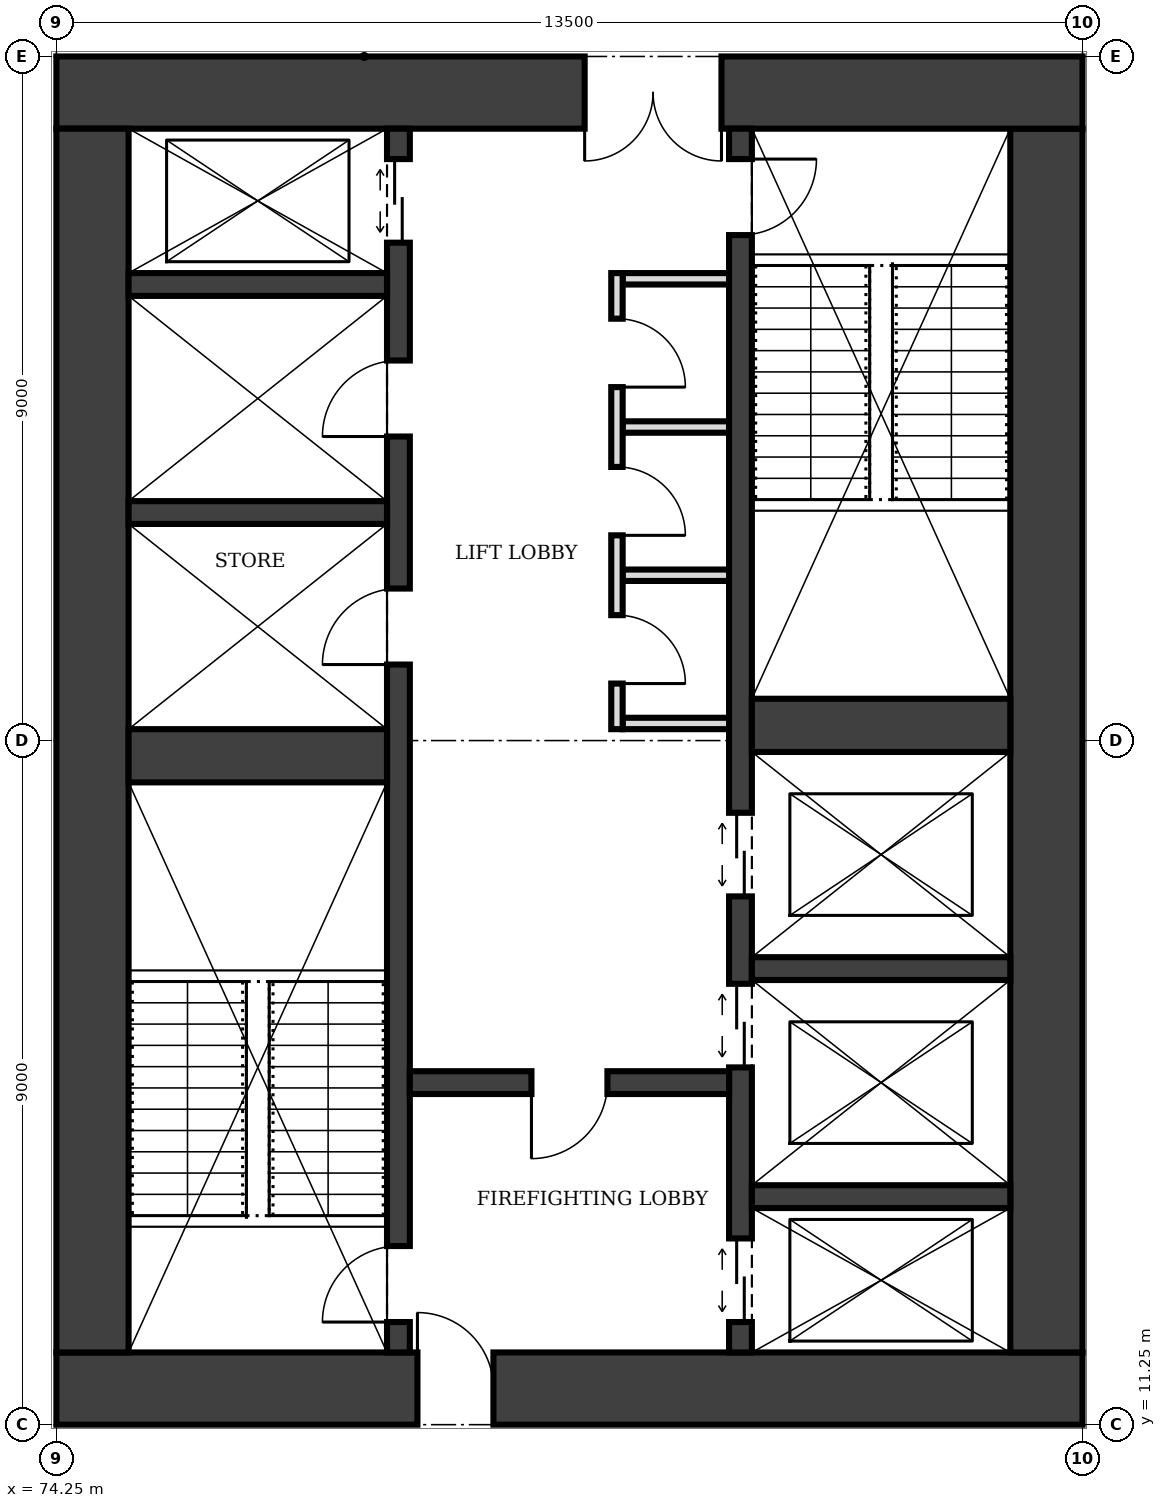
"""IFC4 building model, lengths in metres.
Left out: names, types, materials, properties, quantities, classifications, styles, units other than length and angle.
Written with IfcOpenShell. Run it as: python <this file> out.ifc"""

import sys

from ifc_helpers import new_model, si_unit, direction, frame, frame_2d, origin, place, context, subcontext, project, spatial, rectangle, extrude, element, fill, save


model = new_model("IFC4")
c1 = context("Model", 3, precision=1e-05, world=origin(), true_north=direction((0.0, 1.0)))
c2 = subcontext(c1, "Body", "Model", "MODEL_VIEW")
j1 = project(units=[si_unit("LENGTHUNIT", "METRE"), si_unit("PLANEANGLEUNIT", "RADIAN")], contexts=[c1])
p1 = place(None, origin())
s1 = spatial("IfcSite", under=j1, at=p1, CompositionType="ELEMENT")
p2 = place(p1, origin())
s2 = spatial("IfcBuilding", under=s1, at=p2, CompositionType="ELEMENT")
p3 = place(p2, frame((0.0, 0.0, 125.0)))
s3 = spatial("IfcBuildingStorey", under=s2, at=p3, CompositionType="ELEMENT", Elevation=125.0)
p4 = place(p3, frame((74.25, 11.725, 0.0), z_axis=(0.0, 0.0, 1.0), x_axis=(1.0, 0.0, 0.0)))
e1 = element("IfcWall", 1, at=p4, inside=s3, PredefinedType="SHEAR", context=c2, shape_type="SweptSolid", body=[
    extrude(rectangle(XDim=13.5, YDim=0.95, at=frame_2d((6.75, 0.0))), origin(), (0.0, 0.0, 1.0), 4.0),
])
p5 = place(p4, frame((4.75, 0.0, 0.0)))
e2 = element("IfcOpeningElement", 2, at=p5, cuts=e1, PredefinedType="OPENING", context=c2, shape_type="SweptSolid", body=[
    extrude(rectangle(XDim=1.0, YDim=2.1, at=frame_2d((0.5, 1.05))), frame((0.0, 0.485, 0.0), z_axis=(0.0, -1.0, 0.0), x_axis=(1.0, 0.0, 0.0)), (0.0, 0.0, 1.0), 0.97),
])
p6 = place(p3, frame((87.275, 12.2, 0.0), z_axis=(0.0, 0.0, 1.0), x_axis=(0.0, 1.0, 0.0)))
e3 = element("IfcWall", 3, at=p6, inside=s3, PredefinedType="SHEAR", context=c2, shape_type="SweptSolid", body=[
    extrude(rectangle(XDim=16.1, YDim=0.95, at=frame_2d((8.05, 0.0))), origin(), (0.0, 0.0, 1.0), 4.0),
])
p7 = place(p3, frame((87.75, 28.775, 0.0), z_axis=(0.0, 0.0, 1.0), x_axis=(-1.0, 0.0, 0.0)))
e4 = element("IfcWall", 4, at=p7, inside=s3, PredefinedType="SHEAR", context=c2, shape_type="SweptSolid", body=[
    extrude(rectangle(XDim=13.5, YDim=0.95, at=frame_2d((6.75, 0.0))), origin(), (0.0, 0.0, 1.0), 4.0),
])
p8 = place(p7, frame((4.75, 0.0, 0.0)))
e5 = element("IfcOpeningElement", 5, at=p8, cuts=e4, PredefinedType="OPENING", context=c2, shape_type="SweptSolid", body=[
    extrude(rectangle(XDim=1.8, YDim=2.1, at=frame_2d((0.9, 1.05))), frame((0.0, 0.485, 0.0), z_axis=(0.0, -1.0, 0.0), x_axis=(1.0, 0.0, 0.0)), (0.0, 0.0, 1.0), 0.97),
])
p9 = place(p3, frame((74.725, 28.3, 0.0), z_axis=(0.0, 0.0, 1.0), x_axis=(0.0, -1.0, 0.0)))
e6 = element("IfcWall", 6, at=p9, inside=s3, PredefinedType="SHEAR", context=c2, shape_type="SweptSolid", body=[
    extrude(rectangle(XDim=16.1, YDim=0.95, at=frame_2d((8.05, 0.0))), origin(), (0.0, 0.0, 1.0), 4.0),
])
p10 = place(p3, frame((78.75, 12.2, 0.0), z_axis=(0.0, 0.0, 1.0), x_axis=(0.0, 1.0, 0.0)))
e7 = element("IfcWall", 7, at=p10, inside=s3, PredefinedType="SHEAR", context=c2, shape_type="SweptSolid", body=[
    extrude(rectangle(XDim=16.1, YDim=0.3, at=frame_2d((8.05, 0.0))), origin(), (0.0, 0.0, 1.0), 4.0),
])
p11 = place(p10, frame((0.4, 0.0, 0.0)))
e8 = element("IfcOpeningElement", 8, at=p11, cuts=e7, PredefinedType="OPENING", context=c2, shape_type="SweptSolid", body=[
    extrude(rectangle(XDim=1.0, YDim=2.1, at=frame_2d((0.5, 1.05))), frame((0.0, 0.16, 0.0), z_axis=(0.0, -1.0, 0.0), x_axis=(1.0, 0.0, 0.0)), (0.0, 0.0, 1.0), 0.32),
])
p12 = place(p10, frame((14.6, 0.0, 0.0)))
e9 = element("IfcOpeningElement", 9, at=p12, cuts=e7, PredefinedType="OPENING", context=c2, shape_type="SweptSolid", body=[
    extrude(rectangle(XDim=1.1, YDim=2.1, at=frame_2d((0.55, 1.05))), frame((0.0, 0.16, 0.0), z_axis=(0.0, -1.0, 0.0), x_axis=(1.0, 0.0, 0.0)), (0.0, 0.0, 1.0), 0.32),
])
p13 = place(p10, frame((9.05, 0.0, 0.0)))
e10 = element("IfcOpeningElement", 10, at=p13, cuts=e7, PredefinedType="OPENING", context=c2, shape_type="SweptSolid", body=[
    extrude(rectangle(XDim=1.0, YDim=2.1, at=frame_2d((0.5, 1.05))), frame((0.0, 0.16, 0.0), z_axis=(0.0, -1.0, 0.0), x_axis=(1.0, 0.0, 0.0)), (0.0, 0.0, 1.0), 0.32),
])
p14 = place(p10, frame((12.05, 0.0, 0.0)))
e11 = element("IfcOpeningElement", 11, at=p14, cuts=e7, PredefinedType="OPENING", context=c2, shape_type="SweptSolid", body=[
    extrude(rectangle(XDim=1.0, YDim=2.1, at=frame_2d((0.5, 1.05))), frame((0.0, 0.16, 0.0), z_axis=(0.0, -1.0, 0.0), x_axis=(1.0, 0.0, 0.0)), (0.0, 0.0, 1.0), 0.32),
])
p15 = place(p3, frame((83.25, 12.2, 0.0), z_axis=(0.0, 0.0, 1.0), x_axis=(0.0, 1.0, 0.0)))
e12 = element("IfcWall", 12, at=p15, inside=s3, PredefinedType="SHEAR", context=c2, shape_type="SweptSolid", body=[
    extrude(rectangle(XDim=16.1, YDim=0.3, at=frame_2d((8.05, 0.0))), origin(), (0.0, 0.0, 1.0), 4.0),
])
p16 = place(p15, frame((14.7, 0.0, 0.0)))
e13 = element("IfcOpeningElement", 13, at=p16, cuts=e12, PredefinedType="OPENING", context=c2, shape_type="SweptSolid", body=[
    extrude(rectangle(XDim=1.0, YDim=2.1, at=frame_2d((0.5, 1.05))), frame((0.0, 0.16, 0.0), z_axis=(0.0, -1.0, 0.0), x_axis=(1.0, 0.0, 0.0)), (0.0, 0.0, 1.0), 0.32),
])
p17 = place(p15, frame((0.4, 0.0, 0.0)))
e14 = element("IfcOpeningElement", 14, at=p17, cuts=e12, PredefinedType="OPENING", context=c2, shape_type="SweptSolid", body=[
    extrude(rectangle(XDim=1.1, YDim=2.1, at=frame_2d((0.55, 1.05))), frame((0.0, 0.16, 0.0), z_axis=(0.0, -1.0, 0.0), x_axis=(1.0, 0.0, 0.0)), (0.0, 0.0, 1.0), 0.32),
])
p18 = place(p15, frame((3.75, 0.0, 0.0)))
e15 = element("IfcOpeningElement", 15, at=p18, cuts=e12, PredefinedType="OPENING", context=c2, shape_type="SweptSolid", body=[
    extrude(rectangle(XDim=1.1, YDim=2.1, at=frame_2d((0.55, 1.05))), frame((0.0, 0.16, 0.0), z_axis=(0.0, -1.0, 0.0), x_axis=(1.0, 0.0, 0.0)), (0.0, 0.0, 1.0), 0.32),
])
p19 = place(p15, frame((6.0, 0.0, 0.0)))
e16 = element("IfcOpeningElement", 16, at=p19, cuts=e12, PredefinedType="OPENING", context=c2, shape_type="SweptSolid", body=[
    extrude(rectangle(XDim=1.1, YDim=2.1, at=frame_2d((0.55, 1.05))), frame((0.0, 0.16, 0.0), z_axis=(0.0, -1.0, 0.0), x_axis=(1.0, 0.0, 0.0)), (0.0, 0.0, 1.0), 0.32),
])
p20 = place(p3, frame((75.2, 20.05, 0.0), z_axis=(0.0, 0.0, 1.0), x_axis=(1.0, 0.0, 0.0)))
e17 = element("IfcWall", 17, at=p20, inside=s3, PredefinedType="SHEAR", context=c2, shape_type="SweptSolid", body=[
    extrude(rectangle(XDim=3.4, YDim=0.7, at=frame_2d((1.7, 0.0))), origin(), (0.0, 0.0, 1.0), 4.0),
])
p21 = place(p3, frame((78.9, 15.75, 0.0), z_axis=(0.0, 0.0, 1.0), x_axis=(1.0, 0.0, 0.0)))
e18 = element("IfcWall", 18, at=p21, inside=s3, PredefinedType="SHEAR", context=c2, shape_type="SweptSolid", body=[
    extrude(rectangle(XDim=4.2, YDim=0.3, at=frame_2d((2.1, 0.0))), origin(), (0.0, 0.0, 1.0), 4.0),
])
p22 = place(p21, frame((1.6, 0.0, 0.0)))
e19 = element("IfcOpeningElement", 19, at=p22, cuts=e18, PredefinedType="OPENING", context=c2, shape_type="SweptSolid", body=[
    extrude(rectangle(XDim=1.0, YDim=2.1, at=frame_2d((0.5, 1.05))), frame((0.0, 0.16, 0.0), z_axis=(0.0, -1.0, 0.0), x_axis=(1.0, 0.0, 0.0)), (0.0, 0.0, 1.0), 0.32),
])
for number, where, z_axis, x_axis in (
    (20, (83.4, 14.25, 0.0), (0.0, 0.0, 1.0), (1.0, 0.0, 0.0)),
    (21, (83.4, 17.25, 0.0), (0.0, 0.0, 1.0), (1.0, 0.0, 0.0)),
):
    element("IfcWall", number, at=place(p3, frame(where, z_axis=z_axis, x_axis=x_axis)), inside=s3, PredefinedType="SHEAR", context=c2, shape_type="SweptSolid", body=[
        extrude(rectangle(XDim=3.4, YDim=0.3, at=frame_2d((1.7, 0.0))), origin(), (0.0, 0.0, 1.0), 4.0),
    ])
p23 = place(p3, frame((83.4, 20.45, 0.0), z_axis=(0.0, 0.0, 1.0), x_axis=(1.0, 0.0, 0.0)))
e22 = element("IfcWall", 22, at=p23, inside=s3, PredefinedType="SHEAR", context=c2, shape_type="SweptSolid", body=[
    extrude(rectangle(XDim=3.4, YDim=0.7, at=frame_2d((1.7, 0.0))), origin(), (0.0, 0.0, 1.0), 4.0),
])
for number, where, z_axis, x_axis in (
    (23, (75.2, 23.25, 0.0), (0.0, 0.0, 1.0), (1.0, 0.0, 0.0)),
    (24, (75.2, 26.25, 0.0), (0.0, 0.0, 1.0), (1.0, 0.0, 0.0)),
):
    element("IfcWall", number, at=place(p3, frame(where, z_axis=z_axis, x_axis=x_axis)), inside=s3, PredefinedType="SHEAR", context=c2, shape_type="SweptSolid", body=[
        extrude(rectangle(XDim=3.4, YDim=0.3, at=frame_2d((1.7, 0.0))), origin(), (0.0, 0.0, 1.0), 4.0),
    ])
p24 = place(p3, frame((81.625, 20.4, 0.0), z_axis=(0.0, 0.0, 1.0), x_axis=(0.0, 1.0, 0.0)))
e25 = element("IfcWall", 25, at=p24, inside=s3, PredefinedType="PARTITIONING", context=c2, shape_type="SweptSolid", body=[
    extrude(rectangle(XDim=6.0, YDim=0.15, at=frame_2d((3.0, 0.0))), origin(), (0.0, 0.0, 1.0), 3.75),
])
p25 = place(p24, frame((0.6, 0.0, 0.0)))
e26 = element("IfcOpeningElement", 26, at=p25, cuts=e25, PredefinedType="OPENING", context=c2, shape_type="SweptSolid", body=[
    extrude(rectangle(XDim=0.9, YDim=2.1, at=frame_2d((0.45, 1.05))), frame((0.0, 0.085, 0.0), z_axis=(0.0, -1.0, 0.0), x_axis=(1.0, 0.0, 0.0)), (0.0, 0.0, 1.0), 0.17),
])
p26 = place(p24, frame((2.55, 0.0, 0.0)))
e27 = element("IfcOpeningElement", 27, at=p26, cuts=e25, PredefinedType="OPENING", context=c2, shape_type="SweptSolid", body=[
    extrude(rectangle(XDim=0.9, YDim=2.1, at=frame_2d((0.45, 1.05))), frame((0.0, 0.085, 0.0), z_axis=(0.0, -1.0, 0.0), x_axis=(1.0, 0.0, 0.0)), (0.0, 0.0, 1.0), 0.17),
])
p27 = place(p24, frame((4.5, 0.0, 0.0)))
e28 = element("IfcOpeningElement", 28, at=p27, cuts=e25, PredefinedType="OPENING", context=c2, shape_type="SweptSolid", body=[
    extrude(rectangle(XDim=0.9, YDim=2.1, at=frame_2d((0.45, 1.05))), frame((0.0, 0.085, 0.0), z_axis=(0.0, -1.0, 0.0), x_axis=(1.0, 0.0, 0.0)), (0.0, 0.0, 1.0), 0.17),
])
for number, where, z_axis, x_axis in (
    (29, (81.7, 20.475, 0.0), (0.0, 0.0, 1.0), (1.0, 0.0, 0.0)),
    (30, (81.7, 22.425, 0.0), (0.0, 0.0, 1.0), (1.0, 0.0, 0.0)),
    (31, (81.7, 24.375, 0.0), (0.0, 0.0, 1.0), (1.0, 0.0, 0.0)),
    (32, (81.7, 26.325, 0.0), (0.0, 0.0, 1.0), (1.0, 0.0, 0.0)),
):
    element("IfcWall", number, at=place(p3, frame(where, z_axis=z_axis, x_axis=x_axis)), inside=s3, PredefinedType="PARTITIONING", context=c2, shape_type="SweptSolid", body=[
        extrude(rectangle(XDim=1.4, YDim=0.15, at=frame_2d((0.7, 0.0))), origin(), (0.0, 0.0, 1.0), 3.75),
    ])
p28 = place(p5, origin())
e33 = element("IfcDoor", 33, at=p28, inside=s3, OperationType="SINGLE_SWING_LEFT", PredefinedType="DOOR", context=c2, shape_type="SweptSolid", body=[
    extrude(rectangle(XDim=1.0, YDim=2.1, at=frame_2d((0.5, 1.05))), frame((0.0, 0.025, 0.0), z_axis=(0.0, -1.0, 0.0), x_axis=(1.0, 0.0, 0.0)), (0.0, 0.0, 1.0), 0.05),
])
fill(e2, e33)
p29 = place(p8, origin())
e34 = element("IfcDoor", 34, at=p29, inside=s3, OperationType="DOUBLE_DOOR_SINGLE_SWING", PredefinedType="DOOR", context=c2, shape_type="SweptSolid", body=[
    extrude(rectangle(XDim=1.8, YDim=2.1, at=frame_2d((0.9, 1.05))), frame((0.0, 0.025, 0.0), z_axis=(0.0, -1.0, 0.0), x_axis=(1.0, 0.0, 0.0)), (0.0, 0.0, 1.0), 0.05),
])
fill(e5, e34)
p30 = place(p22, frame((1.0, 0.0, 0.0), z_axis=(0.0, 0.0, 1.0), x_axis=(-1.0, 0.0, 0.0)))
e35 = element("IfcDoor", 35, at=p30, inside=s3, OperationType="SINGLE_SWING_RIGHT", PredefinedType="DOOR", context=c2, shape_type="SweptSolid", body=[
    extrude(rectangle(XDim=1.0, YDim=2.1, at=frame_2d((0.5, 1.05))), frame((0.0, 0.025, 0.0), z_axis=(0.0, -1.0, 0.0), x_axis=(1.0, 0.0, 0.0)), (0.0, 0.0, 1.0), 0.05),
])
fill(e19, e35)
p31 = place(p11, origin())
e36 = element("IfcDoor", 36, at=p31, inside=s3, OperationType="SINGLE_SWING_LEFT", PredefinedType="DOOR", context=c2, shape_type="SweptSolid", body=[
    extrude(rectangle(XDim=1.0, YDim=2.1, at=frame_2d((0.5, 1.05))), frame((0.0, 0.025, 0.0), z_axis=(0.0, -1.0, 0.0), x_axis=(1.0, 0.0, 0.0)), (0.0, 0.0, 1.0), 0.05),
])
fill(e8, e36)
p32 = place(p16, frame((1.0, 0.0, 0.0), z_axis=(0.0, 0.0, 1.0), x_axis=(-1.0, 0.0, 0.0)))
e37 = element("IfcDoor", 37, at=p32, inside=s3, OperationType="SINGLE_SWING_LEFT", PredefinedType="DOOR", context=c2, shape_type="SweptSolid", body=[
    extrude(rectangle(XDim=1.0, YDim=2.1, at=frame_2d((0.5, 1.05))), frame((0.0, 0.025, 0.0), z_axis=(0.0, -1.0, 0.0), x_axis=(1.0, 0.0, 0.0)), (0.0, 0.0, 1.0), 0.05),
])
fill(e13, e37)
p33 = place(p17, origin())
e38 = element("IfcDoor", 38, at=p33, inside=s3, OperationType="DOUBLE_DOOR_SLIDING", PredefinedType="DOOR", context=c2, shape_type="SweptSolid", body=[
    extrude(rectangle(XDim=1.1, YDim=2.1, at=frame_2d((0.55, 1.05))), frame((0.0, 0.025, 0.0), z_axis=(0.0, -1.0, 0.0), x_axis=(1.0, 0.0, 0.0)), (0.0, 0.0, 1.0), 0.05),
])
fill(e14, e38)
p34 = place(p12, origin())
e39 = element("IfcDoor", 39, at=p34, inside=s3, OperationType="DOUBLE_DOOR_SLIDING", PredefinedType="DOOR", context=c2, shape_type="SweptSolid", body=[
    extrude(rectangle(XDim=1.1, YDim=2.1, at=frame_2d((0.55, 1.05))), frame((0.0, 0.025, 0.0), z_axis=(0.0, -1.0, 0.0), x_axis=(1.0, 0.0, 0.0)), (0.0, 0.0, 1.0), 0.05),
])
fill(e9, e39)
p35 = place(p18, origin())
e40 = element("IfcDoor", 40, at=p35, inside=s3, OperationType="DOUBLE_DOOR_SLIDING", PredefinedType="DOOR", context=c2, shape_type="SweptSolid", body=[
    extrude(rectangle(XDim=1.1, YDim=2.1, at=frame_2d((0.55, 1.05))), frame((0.0, 0.025, 0.0), z_axis=(0.0, -1.0, 0.0), x_axis=(1.0, 0.0, 0.0)), (0.0, 0.0, 1.0), 0.05),
])
fill(e15, e40)
p36 = place(p19, origin())
e41 = element("IfcDoor", 41, at=p36, inside=s3, OperationType="DOUBLE_DOOR_SLIDING", PredefinedType="DOOR", context=c2, shape_type="SweptSolid", body=[
    extrude(rectangle(XDim=1.1, YDim=2.1, at=frame_2d((0.55, 1.05))), frame((0.0, 0.025, 0.0), z_axis=(0.0, -1.0, 0.0), x_axis=(1.0, 0.0, 0.0)), (0.0, 0.0, 1.0), 0.05),
])
fill(e16, e41)
p37 = place(p25, frame((0.9, 0.0, 0.0), z_axis=(0.0, 0.0, 1.0), x_axis=(-1.0, 0.0, 0.0)))
e42 = element("IfcDoor", 42, at=p37, inside=s3, OperationType="SINGLE_SWING_RIGHT", PredefinedType="DOOR", context=c2, shape_type="SweptSolid", body=[
    extrude(rectangle(XDim=0.9, YDim=2.1, at=frame_2d((0.45, 1.05))), frame((0.0, 0.025, 0.0), z_axis=(0.0, -1.0, 0.0), x_axis=(1.0, 0.0, 0.0)), (0.0, 0.0, 1.0), 0.05),
])
fill(e26, e42)
p38 = place(p26, frame((0.9, 0.0, 0.0), z_axis=(0.0, 0.0, 1.0), x_axis=(-1.0, 0.0, 0.0)))
e43 = element("IfcDoor", 43, at=p38, inside=s3, OperationType="SINGLE_SWING_RIGHT", PredefinedType="DOOR", context=c2, shape_type="SweptSolid", body=[
    extrude(rectangle(XDim=0.9, YDim=2.1, at=frame_2d((0.45, 1.05))), frame((0.0, 0.025, 0.0), z_axis=(0.0, -1.0, 0.0), x_axis=(1.0, 0.0, 0.0)), (0.0, 0.0, 1.0), 0.05),
])
fill(e27, e43)
p39 = place(p27, frame((0.9, 0.0, 0.0), z_axis=(0.0, 0.0, 1.0), x_axis=(-1.0, 0.0, 0.0)))
e44 = element("IfcDoor", 44, at=p39, inside=s3, OperationType="SINGLE_SWING_RIGHT", PredefinedType="DOOR", context=c2, shape_type="SweptSolid", body=[
    extrude(rectangle(XDim=0.9, YDim=2.1, at=frame_2d((0.45, 1.05))), frame((0.0, 0.025, 0.0), z_axis=(0.0, -1.0, 0.0), x_axis=(1.0, 0.0, 0.0)), (0.0, 0.0, 1.0), 0.05),
])
fill(e28, e44)
p40 = place(p13, origin())
e45 = element("IfcDoor", 45, at=p40, inside=s3, OperationType="SINGLE_SWING_LEFT", PredefinedType="DOOR", context=c2, shape_type="SweptSolid", body=[
    extrude(rectangle(XDim=1.0, YDim=2.1, at=frame_2d((0.5, 1.05))), frame((0.0, 0.025, 0.0), z_axis=(0.0, -1.0, 0.0), x_axis=(1.0, 0.0, 0.0)), (0.0, 0.0, 1.0), 0.05),
])
fill(e10, e45)
p41 = place(p14, origin())
e46 = element("IfcDoor", 46, at=p41, inside=s3, OperationType="SINGLE_SWING_LEFT", PredefinedType="DOOR", context=c2, shape_type="SweptSolid", body=[
    extrude(rectangle(XDim=1.0, YDim=2.1, at=frame_2d((0.5, 1.05))), frame((0.0, 0.025, 0.0), z_axis=(0.0, -1.0, 0.0), x_axis=(1.0, 0.0, 0.0)), (0.0, 0.0, 1.0), 0.05),
])
fill(e11, e46)
save(model, sys.argv[1])
